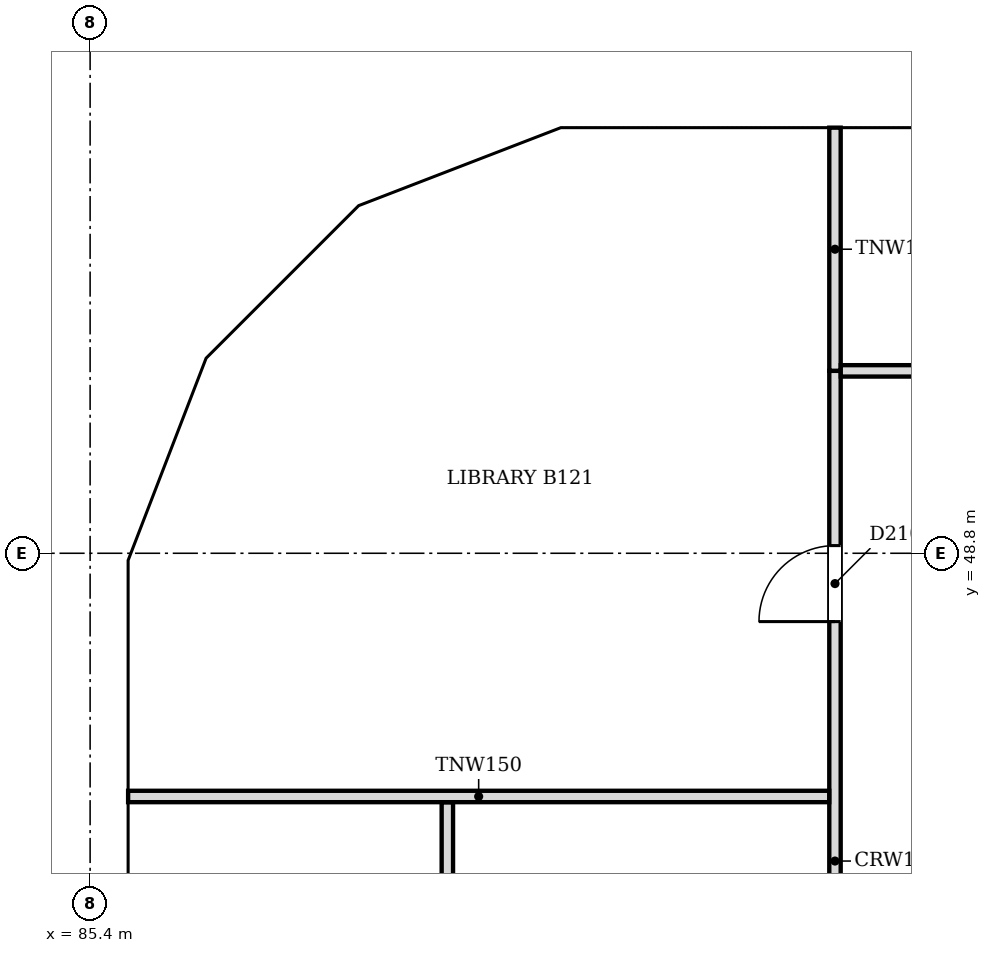
"""IFC4 building model, lengths in metres.
Left out: names, types, materials, properties, quantities, classifications, styles, units other than length and angle.
Written with IfcOpenShell. Run it as: python <this file> out.ifc"""

import sys

from ifc_helpers import new_model, si_unit, direction, frame, frame_2d, origin, place, context, subcontext, project, spatial, polyline, rectangle, outline, extrude, faceted_brep, source, transform, mapped, element, fill, save


model = new_model("IFC4")
c1 = context("Model", 3, precision=1e-05, world=origin(), true_north=direction((0.0, 1.0)))
c2 = subcontext(c1, "Body", "Model", "MODEL_VIEW")
j1 = project(units=[si_unit("LENGTHUNIT", "METRE"), si_unit("PLANEANGLEUNIT", "RADIAN")], contexts=[c1])
p1 = place(None, origin())
s1 = spatial("IfcSite", under=j1, at=p1, CompositionType="ELEMENT")
p2 = place(p1, origin())
s2 = spatial("IfcBuilding", under=s1, at=p2, CompositionType="ELEMENT")
p3 = place(p2, frame((0.0, 0.0, 102.8)))
s3 = spatial("IfcBuildingStorey", under=s2, at=p3, CompositionType="ELEMENT", Elevation=102.8)
m1 = source(origin(), c2, "Body", "Brep", [
    faceted_brep([(3.05, -0.25, 0.0), (6.1, -0.25, 3.8), (6.1, -0.25, 3.8), (3.05, -0.25, 7.6), (0.0, -0.25, 3.8), (0.0, 0.25, 3.8), (3.05, 0.25, 7.6), (6.1, 0.25, 3.8), (6.1, 0.25, 3.8), (3.05, 0.25, 0.0)], [[[0, 1, 2, 3, 4]], [[5, 6, 7, 8, 9]], [[9, 8, 1, 0]], [[7, 6, 3, 2]], [[6, 5, 4, 3]], [[5, 9, 0, 4]], [[1, 8, 7, 2]]]),
])
p4 = place(p3, frame((100.65, 54.65, -3.8), z_axis=(0.0, 0.0, 1.0), x_axis=(-1.0, 0.0, 0.0)))
e1 = element("IfcWall", 1, at=p4, inside=s3, PredefinedType="SOLIDWALL", context=c2, shape_type="MappedRepresentation", body=[
    mapped(m1, transform((0.0, 0.0, 0.0), scale=1.0)),
])
m2 = source(origin(), c2, "Body", "SweptSolid", [
    extrude(outline(polyline([(3.05, 0.399), (5.78, 3.8), (3.05, 7.201), (0.321, 3.8), (3.05, 0.399)])), frame((0.0, 0.26, 0.0), z_axis=(0.0, -1.0, 0.0), x_axis=(1.0, 0.0, 0.0)), (0.0, 0.0, 1.0), 0.52),
])
p5 = place(p4, origin())
e2 = element("IfcOpeningElement", 2, at=p5, cuts=e1, PredefinedType="OPENING", context=c2, shape_type="MappedRepresentation", body=[
    mapped(m2, transform((0.0, 0.0, 0.0), scale=1.0)),
])
m3 = source(origin(), c2, "Body", "Brep", [
    faceted_brep([(3.003, -0.25, 0.0), (3.05, -0.25, 0.06), (3.05, -0.25, 7.54), (3.003, -0.25, 7.6), (0.0, -0.25, 3.8), (0.0, 0.25, 3.8), (2.957, 0.25, 7.541), (2.957, 0.25, 0.059), (3.003, 0.0, 0.0), (3.003, 0.0, 7.6)], [[[0, 1, 2, 3, 4]], [[5, 6, 7]], [[1, 0, 8]], [[9, 3, 2]], [[6, 5, 4, 3, 9]], [[5, 7, 8, 0, 4]], [[1, 8, 7, 6, 9, 2]]]),
])
p6 = place(p3, frame((94.55, 54.65, -3.8), z_axis=(0.0, 0.0, 1.0), x_axis=(-1.0, 0.0, 0.0)))
e3 = element("IfcWall", 3, at=p6, inside=s3, PredefinedType="SOLIDWALL", context=c2, shape_type="MappedRepresentation", body=[
    mapped(m3, transform((0.0, 0.0, 0.0), scale=1.0)),
])
m4 = source(origin(), c2, "Body", "SweptSolid", [
    extrude(outline(polyline([(2.803, 6.944), (0.319, 3.8), (2.803, 0.656), (2.803, 6.944)])), frame((0.0, 0.26, 0.0), z_axis=(0.0, -1.0, 0.0), x_axis=(1.0, 0.0, 0.0)), (0.0, 0.0, 1.0), 0.52),
])
p7 = place(p6, origin())
e4 = element("IfcOpeningElement", 4, at=p7, cuts=e3, PredefinedType="OPENING", context=c2, shape_type="MappedRepresentation", body=[
    mapped(m4, transform((0.0, 0.0, 0.0), scale=1.0)),
])
m5 = source(origin(), c2, "Body", "Brep", [
    faceted_brep([(0.047, -0.25, 0.0), (2.997, -0.25, 3.8), (0.047, -0.25, 7.6), (0.0, -0.25, 7.541), (0.0, -0.25, 0.059), (0.093, 0.25, 7.54), (2.944, 0.25, 3.868), (2.944, 0.25, 3.732), (0.093, 0.25, 0.06), (2.997, 0.0, 3.8), (0.047, 0.0, 0.0), (0.047, 0.0, 7.6)], [[[0, 1, 2, 3, 4]], [[5, 6, 7, 8]], [[8, 7, 9, 1, 0, 10]], [[6, 5, 11, 2, 1, 9]], [[3, 2, 11]], [[10, 0, 4]], [[8, 10, 4, 3, 11, 5]], [[9, 7, 6]]]),
])
p8 = place(p3, frame((91.59, 54.667, -3.8), z_axis=(0.0, 0.0, 1.0), x_axis=(-0.933000876937, -0.359874094142, 0.0)))
e5 = element("IfcWall", 5, at=p8, inside=s3, PredefinedType="SOLIDWALL", context=c2, shape_type="MappedRepresentation", body=[
    mapped(m5, transform((0.0, 0.0, 0.0), scale=1.0)),
])
m6 = source(origin(), c2, "Body", "SweptSolid", [
    extrude(outline(polyline([(0.247, 0.665), (2.681, 3.8), (0.247, 6.935), (0.247, 0.665)])), frame((0.0, 0.26, 0.0), z_axis=(0.0, -1.0, 0.0), x_axis=(1.0, 0.0, 0.0)), (0.0, 0.0, 1.0), 0.52),
])
p9 = place(p8, origin())
e6 = element("IfcOpeningElement", 6, at=p9, cuts=e5, PredefinedType="OPENING", context=c2, shape_type="MappedRepresentation", body=[
    mapped(m6, transform((0.0, 0.0, 0.0), scale=1.0)),
])
m7 = source(origin(), c2, "Body", "Brep", [
    faceted_brep([(2.944, -0.25, 0.0), (2.997, -0.25, 0.068), (2.997, -0.25, 7.532), (2.944, -0.25, 7.6), (0.0, -0.25, 3.8), (0.053, 0.25, 3.868), (2.891, 0.25, 7.532), (2.891, 0.25, 0.068), (0.053, 0.25, 3.732), (2.944, 0.0, 0.0), (2.944, 0.0, 7.6), (0.0, 0.0, 3.8)], [[[0, 1, 2, 3, 4]], [[5, 6, 7, 8]], [[1, 0, 9]], [[10, 3, 2]], [[6, 5, 11, 4, 3, 10]], [[8, 7, 9, 0, 4, 11]], [[8, 11, 5]], [[1, 9, 7, 6, 10, 2]]]),
])
p10 = place(p3, frame((88.794, 53.588, -3.8), z_axis=(0.0, 0.0, 1.0), x_axis=(-0.707066050402, -0.707147509625, 0.0)))
e7 = element("IfcWall", 7, at=p10, inside=s3, PredefinedType="SOLIDWALL", context=c2, shape_type="MappedRepresentation", body=[
    mapped(m7, transform((0.0, 0.0, 0.0), scale=1.0)),
])
m8 = source(origin(), c2, "Body", "SweptSolid", [
    extrude(outline(polyline([(2.744, 6.934), (0.316, 3.8), (2.744, 0.666), (2.744, 6.934)])), frame((0.0, 0.26, 0.0), z_axis=(0.0, -1.0, 0.0), x_axis=(1.0, 0.0, 0.0)), (0.0, 0.0, 1.0), 0.52),
])
p11 = place(p10, origin())
e8 = element("IfcOpeningElement", 8, at=p11, cuts=e7, PredefinedType="OPENING", context=c2, shape_type="MappedRepresentation", body=[
    mapped(m8, transform((0.0, 0.0, 0.0), scale=1.0)),
])
m9 = source(origin(), c2, "Body", "Brep", [
    faceted_brep([(0.053, -0.25, 0.0), (3.003, -0.25, 3.8), (0.053, -0.25, 7.6), (0.0, -0.25, 7.532), (0.0, -0.25, 0.068), (0.106, 0.25, 7.532), (2.957, 0.25, 3.86), (2.957, 0.25, 3.74), (0.106, 0.25, 0.068), (3.003, 0.0, 3.8), (0.053, 0.0, 0.0), (0.053, 0.0, 7.6)], [[[0, 1, 2, 3, 4]], [[5, 6, 7, 8]], [[8, 7, 9, 1, 0, 10]], [[6, 5, 11, 2, 1, 9]], [[3, 2, 11]], [[10, 0, 4]], [[8, 10, 4, 3, 11, 5]], [[9, 7, 6]]]),
])
p12 = place(p3, frame((86.731, 51.556, -3.8), z_axis=(0.0, 0.0, 1.0), x_axis=(-0.359855894603, -0.933007896601, 0.0)))
e9 = element("IfcWall", 9, at=p12, inside=s3, PredefinedType="SOLIDWALL", context=c2, shape_type="MappedRepresentation", body=[
    mapped(m9, transform((0.0, 0.0, 0.0), scale=1.0)),
])
m10 = source(origin(), c2, "Body", "SweptSolid", [
    extrude(outline(polyline([(0.253, 0.665), (2.687, 3.8), (0.253, 6.935), (0.253, 0.665)])), frame((0.0, 0.26, 0.0), z_axis=(0.0, -1.0, 0.0), x_axis=(1.0, 0.0, 0.0)), (0.0, 0.0, 1.0), 0.52),
])
p13 = place(p12, origin())
e10 = element("IfcOpeningElement", 10, at=p13, cuts=e9, PredefinedType="OPENING", context=c2, shape_type="MappedRepresentation", body=[
    mapped(m10, transform((0.0, 0.0, 0.0), scale=1.0)),
])
m11 = source(origin(), c2, "Body", "Brep", [
    faceted_brep([(3.003, -0.25, 0.0), (6.053, -0.25, 3.8), (3.003, -0.25, 7.6), (0.0, -0.25, 3.8), (0.047, 0.25, 3.859), (3.003, 0.25, 7.6), (6.053, 0.25, 3.8), (3.003, 0.25, 0.0), (0.047, 0.25, 3.741), (0.0, 0.0, 3.8)], [[[0, 1, 2, 3]], [[4, 5, 6, 7, 8]], [[7, 6, 1, 0]], [[6, 5, 2, 1]], [[5, 4, 9, 3, 2]], [[8, 7, 0, 3, 9]], [[8, 9, 4]]]),
])
p14 = place(p3, frame((85.65, 48.753, -3.8), z_axis=(0.0, 0.0, 1.0), x_axis=(0.0, -1.0, 0.0)))
e11 = element("IfcWall", 11, at=p14, inside=s3, PredefinedType="SOLIDWALL", context=c2, shape_type="MappedRepresentation", body=[
    mapped(m11, transform((0.0, 0.0, 0.0), scale=1.0)),
])
m12 = source(origin(), c2, "Body", "SweptSolid", [
    extrude(outline(polyline([(3.005, 0.401), (5.733, 3.8), (3.005, 7.199), (0.319, 3.8), (3.005, 0.401)])), frame((0.0, 0.26, 0.0), z_axis=(0.0, -1.0, 0.0), x_axis=(1.0, 0.0, 0.0)), (0.0, 0.0, 1.0), 0.52),
])
p15 = place(p14, origin())
e12 = element("IfcOpeningElement", 12, at=p15, cuts=e11, PredefinedType="OPENING", context=c2, shape_type="MappedRepresentation", body=[
    mapped(m12, transform((0.0, 0.0, 0.0), scale=1.0)),
])
m13 = source(origin(), c2, "Body", "Brep", [
    faceted_brep([(3.05, -0.25, 0.0), (6.053, -0.25, 3.8), (0.0, -0.25, 3.8), (0.0, 0.25, 3.8), (6.007, 0.25, 3.8), (6.007, 0.25, 3.741), (3.05, 0.25, 0.0), (6.053, 0.0, 3.8)], [[[0, 1, 2]], [[3, 4, 5, 6]], [[6, 5, 7, 1, 0]], [[4, 3, 2, 1, 7]], [[3, 6, 0, 2]], [[5, 4, 7]]]),
])
p16 = place(p3, frame((97.6, 54.65, 0.0), z_axis=(0.0, 0.0, 1.0), x_axis=(-1.0, 0.0, 0.0)))
e13 = element("IfcWall", 13, at=p16, inside=s3, PredefinedType="SOLIDWALL", context=c2, shape_type="MappedRepresentation", body=[
    mapped(m13, transform((0.0, 0.0, 0.0), scale=1.0)),
])
m14 = source(origin(), c2, "Body", "SweptSolid", [
    extrude(outline(polyline([(3.049, 0.401), (5.537, 3.55), (0.521, 3.55), (3.049, 0.401)])), frame((0.0, 0.26, 0.0), z_axis=(0.0, -1.0, 0.0), x_axis=(1.0, 0.0, 0.0)), (0.0, 0.0, 1.0), 0.52),
])
p17 = place(p16, origin())
e14 = element("IfcOpeningElement", 14, at=p17, cuts=e13, PredefinedType="OPENING", context=c2, shape_type="MappedRepresentation", body=[
    mapped(m14, transform((0.0, 0.0, 0.0), scale=1.0)),
])
m15 = source(origin(), c2, "Body", "Brep", [
    faceted_brep([(2.95, -0.25, 0.0), (3.003, -0.25, 0.068), (3.003, -0.25, 3.8), (0.0, -0.25, 3.8), (0.047, 0.25, 3.8), (2.898, 0.25, 3.8), (2.898, 0.25, 0.068), (0.047, 0.25, 3.74), (2.95, 0.0, 0.0), (0.0, 0.0, 3.8)], [[[0, 1, 2, 3]], [[4, 5, 6, 7]], [[1, 0, 8]], [[5, 4, 9, 3, 2]], [[7, 6, 8, 0, 3, 9]], [[7, 9, 4]], [[1, 8, 6, 5, 2]]]),
])
p18 = place(p3, frame((91.547, 54.65, 0.0), z_axis=(0.0, 0.0, 1.0), x_axis=(-0.933007896601, -0.359855894603, 0.0)))
e15 = element("IfcWall", 15, at=p18, inside=s3, PredefinedType="SOLIDWALL", context=c2, shape_type="MappedRepresentation", body=[
    mapped(m15, transform((0.0, 0.0, 0.0), scale=1.0)),
])
m16 = source(origin(), c2, "Body", "SweptSolid", [
    extrude(outline(polyline([(2.75, 3.55), (0.511, 3.55), (2.75, 0.665), (2.75, 3.55)])), frame((0.0, 0.26, 0.0), z_axis=(0.0, -1.0, 0.0), x_axis=(1.0, 0.0, 0.0)), (0.0, 0.0, 1.0), 0.52),
])
p19 = place(p18, origin())
e16 = element("IfcOpeningElement", 16, at=p19, cuts=e15, PredefinedType="OPENING", context=c2, shape_type="MappedRepresentation", body=[
    mapped(m16, transform((0.0, 0.0, 0.0), scale=1.0)),
])
m17 = source(origin(), c2, "Body", "Brep", [
    faceted_brep([(0.053, -0.25, 0.0), (2.997, -0.25, 3.8), (0.0, -0.25, 3.8), (0.0, -0.25, 0.068), (0.106, 0.25, 3.8), (2.944, 0.25, 3.8), (2.944, 0.25, 3.732), (0.106, 0.25, 0.068), (2.997, 0.0, 3.8), (0.053, 0.0, 0.0)], [[[0, 1, 2, 3]], [[4, 5, 6, 7]], [[7, 6, 8, 1, 0, 9]], [[5, 4, 2, 1, 8]], [[9, 0, 3]], [[7, 9, 3, 2, 4]], [[6, 5, 8]]]),
])
p20 = place(p3, frame((88.831, 53.625, 0.0), z_axis=(0.0, 0.0, 1.0), x_axis=(-0.707147509625, -0.707066050402, 0.0)))
e17 = element("IfcWall", 17, at=p20, inside=s3, PredefinedType="SOLIDWALL", context=c2, shape_type="MappedRepresentation", body=[
    mapped(m17, transform((0.0, 0.0, 0.0), scale=1.0)),
])
m18 = source(origin(), c2, "Body", "SweptSolid", [
    extrude(outline(polyline([(0.253, 0.666), (2.487, 3.55), (0.253, 3.55), (0.253, 0.666)])), frame((0.0, 0.26, 0.0), z_axis=(0.0, -1.0, 0.0), x_axis=(1.0, 0.0, 0.0)), (0.0, 0.0, 1.0), 0.52),
])
p21 = place(p20, origin())
e18 = element("IfcOpeningElement", 18, at=p21, cuts=e17, PredefinedType="OPENING", context=c2, shape_type="MappedRepresentation", body=[
    mapped(m18, transform((0.0, 0.0, 0.0), scale=1.0)),
])
m19 = source(origin(), c2, "Body", "Brep", [
    faceted_brep([(2.95, -0.25, 0.0), (2.997, -0.25, 0.059), (2.997, -0.25, 3.8), (0.0, -0.25, 3.8), (0.053, 0.25, 3.8), (2.904, 0.25, 3.8), (2.904, 0.25, 0.06), (0.053, 0.25, 3.732), (2.95, 0.0, 0.0), (0.0, 0.0, 3.8)], [[[0, 1, 2, 3]], [[4, 5, 6, 7]], [[1, 0, 8]], [[5, 4, 9, 3, 2]], [[7, 6, 8, 0, 3, 9]], [[7, 9, 4]], [[1, 8, 6, 5, 2]]]),
])
p22 = place(p3, frame((86.712, 51.506, 0.0), z_axis=(0.0, 0.0, 1.0), x_axis=(-0.359874094142, -0.933000876937, 0.0)))
e19 = element("IfcWall", 19, at=p22, inside=s3, PredefinedType="SOLIDWALL", context=c2, shape_type="MappedRepresentation", body=[
    mapped(m19, transform((0.0, 0.0, 0.0), scale=1.0)),
])
p23 = place(p22, origin())
e20 = element("IfcOpeningElement", 20, at=p23, cuts=e19, PredefinedType="OPENING", context=c2, shape_type="MappedRepresentation", body=[
    mapped(m16, transform((0.0, 0.0, 0.0), scale=1.0)),
])
m20 = source(origin(), c2, "Body", "Brep", [
    faceted_brep([(0.047, -0.25, 0.0), (3.05, -0.25, 3.8), (0.0, -0.25, 3.8), (0.0, -0.25, 0.06), (0.093, 0.25, 3.8), (3.05, 0.25, 3.8), (0.093, 0.25, 0.059), (0.047, 0.0, 0.0)], [[[0, 1, 2, 3]], [[4, 5, 6]], [[6, 5, 1, 0, 7]], [[5, 4, 2, 1]], [[7, 0, 3]], [[6, 7, 3, 2, 4]]]),
])
p24 = place(p3, frame((85.65, 48.8, 0.0), z_axis=(0.0, 0.0, 1.0), x_axis=(0.0, -1.0, 0.0)))
e21 = element("IfcWall", 21, at=p24, inside=s3, PredefinedType="SOLIDWALL", context=c2, shape_type="MappedRepresentation", body=[
    mapped(m20, transform((0.0, 0.0, 0.0), scale=1.0)),
])
m21 = source(origin(), c2, "Body", "SweptSolid", [
    extrude(outline(polyline([(0.247, 0.656), (2.534, 3.55), (0.247, 3.55), (0.247, 0.656)])), frame((0.0, 0.26, 0.0), z_axis=(0.0, -1.0, 0.0), x_axis=(1.0, 0.0, 0.0)), (0.0, 0.0, 1.0), 0.52),
])
p25 = place(p24, origin())
e22 = element("IfcOpeningElement", 22, at=p25, cuts=e21, PredefinedType="OPENING", context=c2, shape_type="MappedRepresentation", body=[
    mapped(m21, transform((0.0, 0.0, 0.0), scale=1.0)),
])
m22 = source(origin(), c2, "Body", "SweptSolid", [
    extrude(outline(polyline([(3.05, 0.0), (6.1, 3.8), (0.0, 3.8), (3.05, 0.0)])), frame((0.0, 0.25, 0.0), z_axis=(0.0, -1.0, 0.0), x_axis=(1.0, 0.0, 0.0)), (0.0, 0.0, 1.0), 0.5),
])
p26 = place(p3, frame((85.65, 45.75, 0.0), z_axis=(0.0, 0.0, 1.0), x_axis=(0.0, -1.0, 0.0)))
e23 = element("IfcWall", 23, at=p26, inside=s3, PredefinedType="SOLIDWALL", context=c2, shape_type="MappedRepresentation", body=[
    mapped(m22, transform((0.0, 0.0, 0.0), scale=1.0)),
])
m23 = source(origin(), c2, "Body", "SweptSolid", [
    extrude(outline(polyline([(3.05, 0.399), (5.579, 3.55), (0.521, 3.55), (3.05, 0.399)])), frame((0.0, 0.26, 0.0), z_axis=(0.0, -1.0, 0.0), x_axis=(1.0, 0.0, 0.0)), (0.0, 0.0, 1.0), 0.52),
])
p27 = place(p26, origin())
e24 = element("IfcOpeningElement", 24, at=p27, cuts=e23, PredefinedType="OPENING", context=c2, shape_type="MappedRepresentation", body=[
    mapped(m23, transform((0.0, 0.0, 0.0), scale=1.0)),
])
p28 = place(p3, frame((95.2, 36.6, 0.0), z_axis=(0.0, 0.0, 1.0), x_axis=(0.0, 1.0, 0.0)))
e25 = element("IfcWall", 25, at=p28, inside=s3, PredefinedType="PARTITIONING", context=c2, shape_type="SweptSolid", body=[
    extrude(rectangle(XDim=14.6, YDim=0.15, at=frame_2d((7.3, 0.0))), origin(), (0.0, 0.0, 1.0), 2.715),
])
m24 = source(origin(), c2, "Body", "SweptSolid", [
    extrude(rectangle(XDim=1.0, YDim=2.1, at=frame_2d((0.5, 1.05))), frame((0.0, 0.085, 0.0), z_axis=(0.0, -1.0, 0.0), x_axis=(1.0, 0.0, 0.0)), (0.0, 0.0, 1.0), 0.17),
])
p29 = place(p28, frame((11.301, 0.0, 0.0)))
e26 = element("IfcOpeningElement", 26, at=p29, cuts=e25, PredefinedType="OPENING", context=c2, shape_type="MappedRepresentation", body=[
    mapped(m24, transform((0.0, 0.0, 0.0), scale=1.0)),
])
p30 = place(p28, frame((4.0, 0.0, 0.0)))
e27 = element("IfcOpeningElement", 27, at=p30, cuts=e25, PredefinedType="OPENING", context=c2, shape_type="MappedRepresentation", body=[
    mapped(m24, transform((0.0, 0.0, 0.0), scale=1.0)),
])
p31 = place(p3, frame((90.1, 36.676, 0.0), z_axis=(0.0, 0.0, 1.0), x_axis=(0.0, 1.0, 0.0)))
e28 = element("IfcWall", 28, at=p31, inside=s3, PredefinedType="PARTITIONING", context=c2, shape_type="SweptSolid", body=[
    extrude(rectangle(XDim=8.848, YDim=0.15, at=frame_2d((4.424, 0.0))), origin(), (0.0, 0.0, 1.0), 2.715),
])
m25 = source(origin(), c2, "Body", "SweptSolid", [
    extrude(rectangle(XDim=0.9, YDim=2.1, at=frame_2d((0.45, 1.05))), frame((0.0, 0.085, 0.0), z_axis=(0.0, -1.0, 0.0), x_axis=(1.0, 0.0, 0.0)), (0.0, 0.0, 1.0), 0.17),
])
p32 = place(p31, frame((1.7, 0.0, 0.0)))
e29 = element("IfcOpeningElement", 29, at=p32, cuts=e28, PredefinedType="OPENING", context=c2, shape_type="MappedRepresentation", body=[
    mapped(m25, transform((0.0, 0.0, 0.0), scale=1.0)),
])
p33 = place(p31, frame((6.072, 0.0, 0.0)))
e30 = element("IfcOpeningElement", 30, at=p33, cuts=e28, PredefinedType="OPENING", context=c2, shape_type="MappedRepresentation", body=[
    mapped(m25, transform((0.0, 0.0, 0.0), scale=1.0)),
])
p34 = place(p3, frame((85.9, 45.6, 0.0), z_axis=(0.0, 0.0, 1.0), x_axis=(1.0, 0.0, 0.0)))
e31 = element("IfcWall", 31, at=p34, inside=s3, PredefinedType="PARTITIONING", context=c2, shape_type="SweptSolid", body=[
    extrude(rectangle(XDim=9.224, YDim=0.15, at=frame_2d((4.612, 0.0))), origin(), (0.0, 0.0, 1.0), 2.715),
])
p35 = place(p3, frame((95.2, 51.201, 0.0), z_axis=(0.0, 0.0, 1.0), x_axis=(0.0, 1.0, 0.0)))
e32 = element("IfcWall", 32, at=p35, inside=s3, PredefinedType="PARTITIONING", context=c2, shape_type="SweptSolid", body=[
    extrude(rectangle(XDim=3.199, YDim=0.15, at=frame_2d((1.6, 0.0))), origin(), (0.0, 0.0, 1.0), 2.715),
])
p36 = place(p3, frame((95.276, 51.2, 0.0), z_axis=(0.0, 0.0, 1.0), x_axis=(1.0, 0.0, 0.0)))
e33 = element("IfcWall", 33, at=p36, inside=s3, PredefinedType="PARTITIONING", context=c2, shape_type="SweptSolid", body=[
    extrude(rectangle(XDim=4.724, YDim=0.15, at=frame_2d((2.362, 0.0))), origin(), (0.0, 0.0, 1.0), 2.715),
])
p37 = place(p36, frame((1.9, 0.0, 0.0)))
e34 = element("IfcOpeningElement", 34, at=p37, cuts=e33, PredefinedType="OPENING", context=c2, shape_type="MappedRepresentation", body=[
    mapped(m25, transform((0.0, 0.0, 0.0), scale=1.0)),
])
m26 = source(origin(), c2, "Body", "SweptSolid", [
    extrude(rectangle(XDim=1.0, YDim=2.1, at=frame_2d((0.5, 1.05))), frame((0.0, 0.025, 0.0), z_axis=(0.0, -1.0, 0.0), x_axis=(1.0, 0.0, 0.0)), (0.0, 0.0, 1.0), 0.05),
])
p38 = place(p29, origin())
e35 = element("IfcDoor", 35, at=p38, inside=s3, OperationType="SINGLE_SWING_LEFT", PredefinedType="DOOR", context=c2, shape_type="MappedRepresentation", body=[
    mapped(m26, transform((0.0, 0.0, 0.0), scale=1.0)),
])
fill(e26, e35)
save(model, sys.argv[1])
